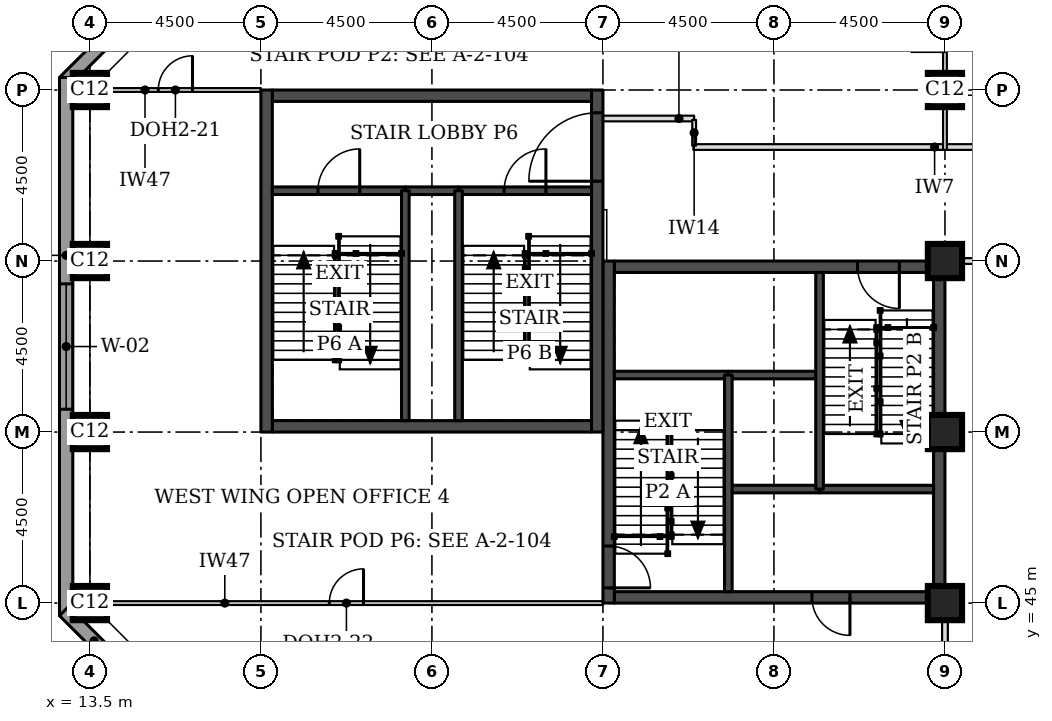
"""IFC4 building model, lengths in metres.
Left out: names, types, materials, properties, quantities, classifications, styles, units other than length and angle.
Written with IfcOpenShell. Run it as: python <this file> out.ifc"""

import sys

from ifc_helpers import new_model, si_unit, direction, frame, frame_2d, origin, origin_2d, place, context, subcontext, project, spatial, rectangle, extrude, element, fill, save


model = new_model("IFC4")
c1 = context("Model", 3, precision=1e-05, world=origin(), true_north=direction((0.0, 1.0)))
c2 = subcontext(c1, "Body", "Model", "MODEL_VIEW")
j1 = project(units=[si_unit("LENGTHUNIT", "METRE"), si_unit("PLANEANGLEUNIT", "RADIAN")], contexts=[c1])
p1 = place(None, origin())
s1 = spatial("IfcSite", under=j1, at=p1, CompositionType="ELEMENT")
p2 = place(p1, origin())
s2 = spatial("IfcBuilding", under=s1, at=p2, CompositionType="ELEMENT")
p3 = place(p2, frame((0.0, 0.0, 155.1)))
s3 = spatial("IfcBuildingStorey", under=s2, at=p3, CompositionType="ELEMENT", Elevation=155.1)
for number, where, z_axis, x_axis in (
    (1, (13.5, 45.0, 0.0), (0.0, 0.0, 1.0), (1.0, 0.0, 0.0)),
    (2, (36.0, 45.0, 0.0), (0.0, 0.0, 1.0), (1.0, 0.0, 0.0)),
    (3, (13.5, 49.5, 0.0), (0.0, 0.0, 1.0), (1.0, 0.0, 0.0)),
    (4, (36.0, 49.5, 0.0), (0.0, 0.0, 1.0), (1.0, 0.0, 0.0)),
    (5, (13.5, 54.0, 0.0), (0.0, 0.0, 1.0), (1.0, 0.0, 0.0)),
    (6, (36.0, 54.0, 0.0), (0.0, 0.0, 1.0), (1.0, 0.0, 0.0)),
    (7, (13.5, 58.5, 0.0), (0.0, 0.0, 1.0), (1.0, 0.0, 0.0)),
    (8, (36.0, 58.5, 0.0), (0.0, 0.0, 1.0), (1.0, 0.0, 0.0)),
):
    element("IfcColumn", number, at=place(p3, frame(where, z_axis=z_axis, x_axis=x_axis)), inside=s3, PredefinedType="COLUMN", context=c2, shape_type="SweptSolid", body=[
        extrude(rectangle(XDim=0.9, YDim=0.9, at=origin_2d()), origin(), (0.0, 0.0, 1.0), 3.7),
    ])
p4 = place(p3, frame((27.3, 45.15, 0.0), z_axis=(0.0, 0.0, 1.0), x_axis=(1.0, 0.0, 0.0)))
e9 = element("IfcWall", 9, at=p4, inside=s3, PredefinedType="SHEAR", context=c2, shape_type="SweptSolid", body=[
    extrude(rectangle(XDim=8.4, YDim=0.3, at=frame_2d((4.2, 0.0))), origin(), (0.0, 0.0, 1.0), 3.7),
])
p5 = place(p4, frame((5.2, 0.0, 0.0)))
e10 = element("IfcOpeningElement", 10, at=p5, cuts=e9, PredefinedType="OPENING", context=c2, shape_type="SweptSolid", body=[
    extrude(rectangle(XDim=1.0, YDim=2.1, at=frame_2d((0.5, 1.05))), frame((0.0, 0.16, 0.0), z_axis=(0.0, -1.0, 0.0), x_axis=(1.0, 0.0, 0.0)), (0.0, 0.0, 1.0), 0.32),
])
p6 = place(p3, frame((27.3, 53.85, 0.0), z_axis=(0.0, 0.0, 1.0), x_axis=(1.0, 0.0, 0.0)))
e11 = element("IfcWall", 11, at=p6, inside=s3, PredefinedType="SHEAR", context=c2, shape_type="SweptSolid", body=[
    extrude(rectangle(XDim=8.4, YDim=0.3, at=frame_2d((4.2, 0.0))), origin(), (0.0, 0.0, 1.0), 3.7),
])
p7 = place(p6, frame((6.4, 0.0, 0.0)))
e12 = element("IfcOpeningElement", 12, at=p7, cuts=e11, PredefinedType="OPENING", context=c2, shape_type="SweptSolid", body=[
    extrude(rectangle(XDim=1.1, YDim=2.1, at=frame_2d((0.55, 1.05))), frame((0.0, 0.16, 0.0), z_axis=(0.0, -1.0, 0.0), x_axis=(1.0, 0.0, 0.0)), (0.0, 0.0, 1.0), 0.32),
])
p8 = place(p3, frame((27.15, 45.0, 0.0), z_axis=(0.0, 0.0, 1.0), x_axis=(0.0, 1.0, 0.0)))
e13 = element("IfcWall", 13, at=p8, inside=s3, PredefinedType="SHEAR", context=c2, shape_type="SweptSolid", body=[
    extrude(rectangle(XDim=9.0, YDim=0.3, at=frame_2d((4.5, 0.0))), origin(), (0.0, 0.0, 1.0), 3.7),
])
p9 = place(p8, frame((0.4, 0.0, 0.0)))
e14 = element("IfcOpeningElement", 14, at=p9, cuts=e13, PredefinedType="OPENING", context=c2, shape_type="SweptSolid", body=[
    extrude(rectangle(XDim=1.1, YDim=2.1, at=frame_2d((0.55, 1.05))), frame((0.0, 0.16, 0.0), z_axis=(0.0, -1.0, 0.0), x_axis=(1.0, 0.0, 0.0)), (0.0, 0.0, 1.0), 0.32),
])
p10 = place(p3, frame((35.85, 45.0, 0.0), z_axis=(0.0, 0.0, 1.0), x_axis=(0.0, 1.0, 0.0)))
e15 = element("IfcWall", 15, at=p10, inside=s3, PredefinedType="SHEAR", context=c2, shape_type="SweptSolid", body=[
    extrude(rectangle(XDim=9.0, YDim=0.3, at=frame_2d((4.5, 0.0))), origin(), (0.0, 0.0, 1.0), 3.7),
])
for number, where, z_axis, x_axis in (
    (16, (18.3, 49.65, 0.0), (0.0, 0.0, 1.0), (1.0, 0.0, 0.0)),
    (17, (18.3, 58.35, 0.0), (0.0, 0.0, 1.0), (1.0, 0.0, 0.0)),
):
    element("IfcWall", number, at=place(p3, frame(where, z_axis=z_axis, x_axis=x_axis)), inside=s3, PredefinedType="SHEAR", context=c2, shape_type="SweptSolid", body=[
        extrude(rectangle(XDim=8.4, YDim=0.3, at=frame_2d((4.2, 0.0))), origin(), (0.0, 0.0, 1.0), 3.7),
    ])
p11 = place(p3, frame((18.15, 49.5, 0.0), z_axis=(0.0, 0.0, 1.0), x_axis=(0.0, 1.0, 0.0)))
e18 = element("IfcWall", 18, at=p11, inside=s3, PredefinedType="SHEAR", context=c2, shape_type="SweptSolid", body=[
    extrude(rectangle(XDim=9.0, YDim=0.3, at=frame_2d((4.5, 0.0))), origin(), (0.0, 0.0, 1.0), 3.7),
])
p12 = place(p3, frame((26.85, 49.5, 0.0), z_axis=(0.0, 0.0, 1.0), x_axis=(0.0, 1.0, 0.0)))
e19 = element("IfcWall", 19, at=p12, inside=s3, PredefinedType="SHEAR", context=c2, shape_type="SweptSolid", body=[
    extrude(rectangle(XDim=9.0, YDim=0.3, at=frame_2d((4.5, 0.0))), origin(), (0.0, 0.0, 1.0), 3.7),
])
p13 = place(p12, frame((6.6, 0.0, 0.0)))
e20 = element("IfcOpeningElement", 20, at=p13, cuts=e19, PredefinedType="OPENING", context=c2, shape_type="SweptSolid", body=[
    extrude(rectangle(XDim=1.8, YDim=2.1, at=frame_2d((0.9, 1.05))), frame((0.0, 0.16, 0.0), z_axis=(0.0, -1.0, 0.0), x_axis=(1.0, 0.0, 0.0)), (0.0, 0.0, 1.0), 0.32),
])
p14 = place(p3, frame((17.792, 63.676, 0.0), z_axis=(0.0, 0.0, 1.0), x_axis=(-0.707106781187, -0.707106781187, 0.0)))
e21 = element("IfcWall", 21, at=p14, inside=s3, PredefinedType="STANDARD", context=c2, shape_type="SweptSolid", body=[
    extrude(rectangle(XDim=7.027, YDim=0.35, at=frame_2d((3.513, 0.0))), origin(), (0.0, 0.0, 1.0), 3.525),
])
p15 = place(p14, frame((1.863, 0.0, 0.9)))
e22 = element("IfcOpeningElement", 22, at=p15, cuts=e21, PredefinedType="OPENING", context=c2, shape_type="SweptSolid", body=[
    extrude(rectangle(XDim=3.3, YDim=1.9, at=frame_2d((1.65, 0.95))), frame((0.0, 0.185, 0.0), z_axis=(0.0, -1.0, 0.0), x_axis=(1.0, 0.0, 0.0)), (0.0, 0.0, 1.0), 0.37),
])
p16 = place(p3, frame((12.875, 58.831, 0.0), z_axis=(0.0, 0.0, 1.0), x_axis=(0.0, -1.0, 0.0)))
e23 = element("IfcWall", 23, at=p16, inside=s3, PredefinedType="STANDARD", context=c2, shape_type="SweptSolid", body=[
    extrude(rectangle(XDim=14.163, YDim=0.35, at=frame_2d((7.081, 0.0))), origin(), (0.0, 0.0, 1.0), 3.525),
])
p17 = place(p16, frame((5.431, 0.0, 0.9)))
e24 = element("IfcOpeningElement", 24, at=p17, cuts=e23, PredefinedType="OPENING", context=c2, shape_type="SweptSolid", body=[
    extrude(rectangle(XDim=3.3, YDim=1.9, at=frame_2d((1.65, 0.95))), frame((0.0, 0.185, 0.0), z_axis=(0.0, -1.0, 0.0), x_axis=(1.0, 0.0, 0.0)), (0.0, 0.0, 1.0), 0.37),
])
p18 = place(p3, frame((12.824, 44.792, 0.0), z_axis=(0.0, 0.0, 1.0), x_axis=(0.707106781187, -0.707106781187, 0.0)))
e25 = element("IfcWall", 25, at=p18, inside=s3, PredefinedType="STANDARD", context=c2, shape_type="SweptSolid", body=[
    extrude(rectangle(XDim=7.027, YDim=0.35, at=frame_2d((3.513, 0.0))), origin(), (0.0, 0.0, 1.0), 3.525),
])
p19 = place(p18, frame((1.863, 0.0, 0.9)))
e26 = element("IfcOpeningElement", 26, at=p19, cuts=e25, PredefinedType="OPENING", context=c2, shape_type="SweptSolid", body=[
    extrude(rectangle(XDim=3.3, YDim=1.9, at=frame_2d((1.65, 0.95))), frame((0.0, 0.185, 0.0), z_axis=(0.0, -1.0, 0.0), x_axis=(1.0, 0.0, 0.0)), (0.0, 0.0, 1.0), 0.37),
])
p20 = place(p3, frame((36.45, 54.0, 0.0), z_axis=(0.0, 0.0, 1.0), x_axis=(1.0, 0.0, 0.0)))
e27 = element("IfcWall", 27, at=p20, inside=s3, PredefinedType="PARTITIONING", context=c2, shape_type="SweptSolid", body=[
    extrude(rectangle(XDim=5.625, YDim=0.15, at=frame_2d((2.812, 0.0))), origin(), (0.0, 0.0, 1.0), 3.55),
])
p21 = place(p3, frame((29.38, 57.0, 0.0), z_axis=(0.0, 0.0, 1.0), x_axis=(1.0, 0.0, 0.0)))
e28 = element("IfcWall", 28, at=p21, inside=s3, PredefinedType="PARTITIONING", context=c2, shape_type="SweptSolid", body=[
    extrude(rectangle(XDim=12.695, YDim=0.15, at=frame_2d((6.348, 0.0))), origin(), (0.0, 0.0, 1.0), 3.55),
])
p22 = place(p3, frame((36.0, 40.95, 0.0), z_axis=(0.0, 0.0, 1.0), x_axis=(0.0, 1.0, 0.0)))
e29 = element("IfcWall", 29, at=p22, inside=s3, PredefinedType="PARTITIONING", context=c2, shape_type="SweptSolid", body=[
    extrude(rectangle(XDim=3.63, YDim=0.15, at=frame_2d((1.815, 0.0))), origin(), (0.0, 0.0, 1.0), 2.8),
])
p23 = place(p22, frame((1.4, 0.0, 0.0)))
e30 = element("IfcOpeningElement", 30, at=p23, cuts=e29, PredefinedType="OPENING", context=c2, shape_type="SweptSolid", body=[
    extrude(rectangle(XDim=0.9, YDim=2.1, at=frame_2d((0.45, 1.05))), frame((0.0, 0.085, 0.0), z_axis=(0.0, -1.0, 0.0), x_axis=(1.0, 0.0, 0.0)), (0.0, 0.0, 1.0), 0.17),
])
p24 = place(p3, frame((36.0, 63.0, 0.0), z_axis=(0.0, 0.0, 1.0), x_axis=(0.0, -1.0, 0.0)))
e31 = element("IfcWall", 31, at=p24, inside=s3, PredefinedType="PARTITIONING", context=c2, shape_type="SweptSolid", body=[
    extrude(rectangle(XDim=6.075, YDim=0.1, at=frame_2d((3.038, 0.0))), origin(), (0.0, 0.0, 1.0), 2.8),
])
p25 = place(p24, frame((2.588, 0.0, 0.0)))
e32 = element("IfcOpeningElement", 32, at=p25, cuts=e31, PredefinedType="OPENING", context=c2, shape_type="SweptSolid", body=[
    extrude(rectangle(XDim=0.9, YDim=2.1, at=frame_2d((0.45, 1.05))), frame((0.0, 0.06, 0.0), z_axis=(0.0, -1.0, 0.0), x_axis=(1.0, 0.0, 0.0)), (0.0, 0.0, 1.0), 0.12),
])
p26 = place(p3, frame((13.5, 58.5, 0.0), z_axis=(0.0, 0.0, 1.0), x_axis=(1.0, 0.0, 0.0)))
e33 = element("IfcWall", 33, at=p26, inside=s3, PredefinedType="PARTITIONING", context=c2, shape_type="SweptSolid", body=[
    extrude(rectangle(XDim=4.5, YDim=0.1, at=frame_2d((2.25, 0.0))), origin(), (0.0, 0.0, 1.0), 2.55),
])
p27 = place(p26, frame((1.8, 0.0, 0.0)))
e34 = element("IfcOpeningElement", 34, at=p27, cuts=e33, PredefinedType="OPENING", context=c2, shape_type="SweptSolid", body=[
    extrude(rectangle(XDim=0.9, YDim=2.1, at=frame_2d((0.45, 1.05))), frame((0.0, 0.06, 0.0), z_axis=(0.0, -1.0, 0.0), x_axis=(1.0, 0.0, 0.0)), (0.0, 0.0, 1.0), 0.12),
])
p28 = place(p3, frame((13.5, 45.0, 0.0), z_axis=(0.0, 0.0, 1.0), x_axis=(1.0, 0.0, 0.0)))
e35 = element("IfcWall", 35, at=p28, inside=s3, PredefinedType="PARTITIONING", context=c2, shape_type="SweptSolid", body=[
    extrude(rectangle(XDim=13.5, YDim=0.1, at=frame_2d((6.75, 0.0))), origin(), (0.0, 0.0, 1.0), 2.55),
])
p29 = place(p28, frame((6.3, 0.0, 0.0)))
e36 = element("IfcOpeningElement", 36, at=p29, cuts=e35, PredefinedType="OPENING", context=c2, shape_type="SweptSolid", body=[
    extrude(rectangle(XDim=0.9, YDim=2.1, at=frame_2d((0.45, 1.05))), frame((0.0, 0.06, 0.0), z_axis=(0.0, -1.0, 0.0), x_axis=(1.0, 0.0, 0.0)), (0.0, 0.0, 1.0), 0.12),
])
p30 = place(p3, frame((27.0, 57.75, 0.0), z_axis=(0.0, 0.0, 1.0), x_axis=(1.0, 0.0, 0.0)))
e37 = element("IfcWall", 37, at=p30, inside=s3, PredefinedType="PARTITIONING", context=c2, shape_type="SweptSolid", body=[
    extrude(rectangle(XDim=2.4, YDim=0.15, at=frame_2d((1.2, 0.0))), origin(), (0.0, 0.0, 1.0), 3.55),
])
p31 = place(p3, frame((29.4, 57.715, 0.0), z_axis=(0.0, 0.0, 1.0), x_axis=(0.0, -1.0, 0.0)))
e38 = element("IfcWall", 38, at=p31, inside=s3, PredefinedType="PARTITIONING", context=c2, shape_type="SweptSolid", body=[
    extrude(rectangle(XDim=0.68, YDim=0.1, at=frame_2d((0.34, 0.0))), origin(), (0.0, 0.0, 1.0), 3.55),
])
p32 = place(p3, frame((30.3, 48.0, 0.0), z_axis=(0.0, 0.0, 1.0), x_axis=(1.0, 0.0, 0.0)))
e39 = element("IfcWall", 39, at=p32, inside=s3, PredefinedType="SOLIDWALL", context=c2, shape_type="SweptSolid", body=[
    extrude(rectangle(XDim=2.4, YDim=0.2, at=frame_2d((1.2, 0.0))), origin(), (0.0, 0.0, 1.0), 3.55),
])
p33 = place(p3, frame((32.7, 48.0, 0.0), z_axis=(0.0, 0.0, 1.0), x_axis=(1.0, 0.0, 0.0)))
e40 = element("IfcWall", 40, at=p33, inside=s3, PredefinedType="SOLIDWALL", context=c2, shape_type="SweptSolid", body=[
    extrude(rectangle(XDim=3.0, YDim=0.2, at=frame_2d((1.5, 0.0))), origin(), (0.0, 0.0, 1.0), 3.55),
])
p34 = place(p3, frame((30.3, 51.0, 0.0), z_axis=(0.0, 0.0, 1.0), x_axis=(1.0, 0.0, 0.0)))
e41 = element("IfcWall", 41, at=p34, inside=s3, PredefinedType="SOLIDWALL", context=c2, shape_type="SweptSolid", body=[
    extrude(rectangle(XDim=2.4, YDim=0.2, at=frame_2d((1.2, 0.0))), origin(), (0.0, 0.0, 1.0), 3.7),
])
p35 = place(p3, frame((27.3, 51.0, 0.0), z_axis=(0.0, 0.0, 1.0), x_axis=(1.0, 0.0, 0.0)))
e42 = element("IfcWall", 42, at=p35, inside=s3, PredefinedType="SOLIDWALL", context=c2, shape_type="SweptSolid", body=[
    extrude(rectangle(XDim=3.0, YDim=0.2, at=frame_2d((1.5, 0.0))), origin(), (0.0, 0.0, 1.0), 3.55),
])
for number, where, z_axis, x_axis in (
    (43, (30.3, 45.3, 0.0), (0.0, 0.0, 1.0), (0.0, 1.0, 0.0)),
    (44, (32.7, 48.0, 0.0), (0.0, 0.0, 1.0), (0.0, 1.0, 0.0)),
):
    element("IfcWall", number, at=place(p3, frame(where, z_axis=z_axis, x_axis=x_axis)), inside=s3, PredefinedType="SOLIDWALL", context=c2, shape_type="SweptSolid", body=[
        extrude(rectangle(XDim=5.7, YDim=0.2, at=frame_2d((2.85, 0.0))), origin(), (0.0, 0.0, 1.0), 3.55),
    ])
p36 = place(p3, frame((21.8, 55.85, 0.0), z_axis=(0.0, 0.0, 1.0), x_axis=(1.0, 0.0, 0.0)))
e45 = element("IfcWall", 45, at=p36, inside=s3, PredefinedType="SOLIDWALL", context=c2, shape_type="SweptSolid", body=[
    extrude(rectangle(XDim=1.4, YDim=0.2, at=frame_2d((0.7, 0.0))), origin(), (0.0, 0.0, 1.0), 3.55),
])
p37 = place(p3, frame((18.3, 55.85, 0.0), z_axis=(0.0, 0.0, 1.0), x_axis=(1.0, 0.0, 0.0)))
e46 = element("IfcWall", 46, at=p37, inside=s3, PredefinedType="SOLIDWALL", context=c2, shape_type="SweptSolid", body=[
    extrude(rectangle(XDim=3.5, YDim=0.2, at=frame_2d((1.75, 0.0))), origin(), (0.0, 0.0, 1.0), 3.55),
])
p38 = place(p37, frame((1.2, 0.0, 0.0)))
e47 = element("IfcOpeningElement", 47, at=p38, cuts=e46, PredefinedType="OPENING", context=c2, shape_type="SweptSolid", body=[
    extrude(rectangle(XDim=1.1, YDim=2.1, at=frame_2d((0.55, 1.05))), frame((0.0, 0.11, 0.0), z_axis=(0.0, -1.0, 0.0), x_axis=(1.0, 0.0, 0.0)), (0.0, 0.0, 1.0), 0.22),
])
p39 = place(p3, frame((23.2, 55.85, 0.0), z_axis=(0.0, 0.0, 1.0), x_axis=(1.0, 0.0, 0.0)))
e48 = element("IfcWall", 48, at=p39, inside=s3, PredefinedType="SOLIDWALL", context=c2, shape_type="SweptSolid", body=[
    extrude(rectangle(XDim=3.5, YDim=0.2, at=frame_2d((1.75, 0.0))), origin(), (0.0, 0.0, 1.0), 3.55),
])
p40 = place(p39, frame((1.2, 0.0, 0.0)))
e49 = element("IfcOpeningElement", 49, at=p40, cuts=e48, PredefinedType="OPENING", context=c2, shape_type="SweptSolid", body=[
    extrude(rectangle(XDim=1.1, YDim=2.1, at=frame_2d((0.55, 1.05))), frame((0.0, 0.11, 0.0), z_axis=(0.0, -1.0, 0.0), x_axis=(1.0, 0.0, 0.0)), (0.0, 0.0, 1.0), 0.22),
])
for number, where, z_axis, x_axis in (
    (50, (21.8, 49.8, 0.0), (0.0, 0.0, 1.0), (0.0, 1.0, 0.0)),
    (51, (23.2, 49.8, 0.0), (0.0, 0.0, 1.0), (0.0, 1.0, 0.0)),
):
    element("IfcWall", number, at=place(p3, frame(where, z_axis=z_axis, x_axis=x_axis)), inside=s3, PredefinedType="SOLIDWALL", context=c2, shape_type="SweptSolid", body=[
        extrude(rectangle(XDim=6.05, YDim=0.2, at=frame_2d((3.025, 0.0))), origin(), (0.0, 0.0, 1.0), 3.55),
    ])
p41 = place(p17, origin())
e52 = element("IfcWindow", 52, at=p41, inside=s3, PartitioningType="SINGLE_PANEL", PredefinedType="WINDOW", context=c2, shape_type="SweptSolid", body=[
    extrude(rectangle(XDim=3.3, YDim=1.9, at=frame_2d((1.65, 0.95))), frame((0.0, 0.085, 0.0), z_axis=(0.0, -1.0, 0.0), x_axis=(1.0, 0.0, 0.0)), (0.0, 0.0, 1.0), 0.06),
])
fill(e24, e52)
p42 = place(p27, origin())
e53 = element("IfcDoor", 53, at=p42, inside=s3, OperationType="SINGLE_SWING_RIGHT", PredefinedType="DOOR", context=c2, shape_type="SweptSolid", body=[
    extrude(rectangle(XDim=0.9, YDim=2.1, at=frame_2d((0.45, 1.05))), frame((0.0, 0.025, 0.0), z_axis=(0.0, -1.0, 0.0), x_axis=(1.0, 0.0, 0.0)), (0.0, 0.0, 1.0), 0.05),
])
fill(e34, e53)
p43 = place(p29, origin())
e54 = element("IfcDoor", 54, at=p43, inside=s3, OperationType="SINGLE_SWING_RIGHT", PredefinedType="DOOR", context=c2, shape_type="SweptSolid", body=[
    extrude(rectangle(XDim=0.9, YDim=2.1, at=frame_2d((0.45, 1.05))), frame((0.0, 0.025, 0.0), z_axis=(0.0, -1.0, 0.0), x_axis=(1.0, 0.0, 0.0)), (0.0, 0.0, 1.0), 0.05),
])
fill(e36, e54)
p44 = place(p9, frame((1.1, 0.0, 0.0), z_axis=(0.0, 0.0, 1.0), x_axis=(-1.0, 0.0, 0.0)))
e55 = element("IfcDoor", 55, at=p44, inside=s3, OperationType="SINGLE_SWING_RIGHT", PredefinedType="DOOR", context=c2, shape_type="SweptSolid", body=[
    extrude(rectangle(XDim=1.1, YDim=2.1, at=frame_2d((0.55, 1.05))), frame((0.0, 0.025, 0.0), z_axis=(0.0, -1.0, 0.0), x_axis=(1.0, 0.0, 0.0)), (0.0, 0.0, 1.0), 0.05),
])
fill(e14, e55)
p45 = place(p7, frame((1.1, 0.0, 0.0), z_axis=(0.0, 0.0, 1.0), x_axis=(-1.0, 0.0, 0.0)))
e56 = element("IfcDoor", 56, at=p45, inside=s3, OperationType="SINGLE_SWING_LEFT", PredefinedType="DOOR", context=c2, shape_type="SweptSolid", body=[
    extrude(rectangle(XDim=1.1, YDim=2.1, at=frame_2d((0.55, 1.05))), frame((0.0, 0.025, 0.0), z_axis=(0.0, -1.0, 0.0), x_axis=(1.0, 0.0, 0.0)), (0.0, 0.0, 1.0), 0.05),
])
fill(e12, e56)
p46 = place(p5, frame((1.0, 0.0, 0.0), z_axis=(0.0, 0.0, 1.0), x_axis=(-1.0, 0.0, 0.0)))
e57 = element("IfcDoor", 57, at=p46, inside=s3, OperationType="SINGLE_SWING_LEFT", PredefinedType="DOOR", context=c2, shape_type="SweptSolid", body=[
    extrude(rectangle(XDim=1.0, YDim=2.1, at=frame_2d((0.5, 1.05))), frame((0.0, 0.025, 0.0), z_axis=(0.0, -1.0, 0.0), x_axis=(1.0, 0.0, 0.0)), (0.0, 0.0, 1.0), 0.05),
])
fill(e10, e57)
p47 = place(p38, origin())
e58 = element("IfcDoor", 58, at=p47, inside=s3, OperationType="SINGLE_SWING_RIGHT", PredefinedType="DOOR", context=c2, shape_type="SweptSolid", body=[
    extrude(rectangle(XDim=1.1, YDim=2.1, at=frame_2d((0.55, 1.05))), frame((0.0, 0.025, 0.0), z_axis=(0.0, -1.0, 0.0), x_axis=(1.0, 0.0, 0.0)), (0.0, 0.0, 1.0), 0.05),
])
fill(e47, e58)
p48 = place(p40, origin())
e59 = element("IfcDoor", 59, at=p48, inside=s3, OperationType="SINGLE_SWING_RIGHT", PredefinedType="DOOR", context=c2, shape_type="SweptSolid", body=[
    extrude(rectangle(XDim=1.1, YDim=2.1, at=frame_2d((0.55, 1.05))), frame((0.0, 0.025, 0.0), z_axis=(0.0, -1.0, 0.0), x_axis=(1.0, 0.0, 0.0)), (0.0, 0.0, 1.0), 0.05),
])
fill(e49, e59)
p49 = place(p13, origin())
e60 = element("IfcDoor", 60, at=p49, inside=s3, OperationType="SINGLE_SWING_LEFT", PredefinedType="DOOR", context=c2, shape_type="SweptSolid", body=[
    extrude(rectangle(XDim=1.8, YDim=2.1, at=frame_2d((0.9, 1.05))), frame((0.0, 0.025, 0.0), z_axis=(0.0, -1.0, 0.0), x_axis=(1.0, 0.0, 0.0)), (0.0, 0.0, 1.0), 0.05),
])
fill(e20, e60)
save(model, sys.argv[1])
